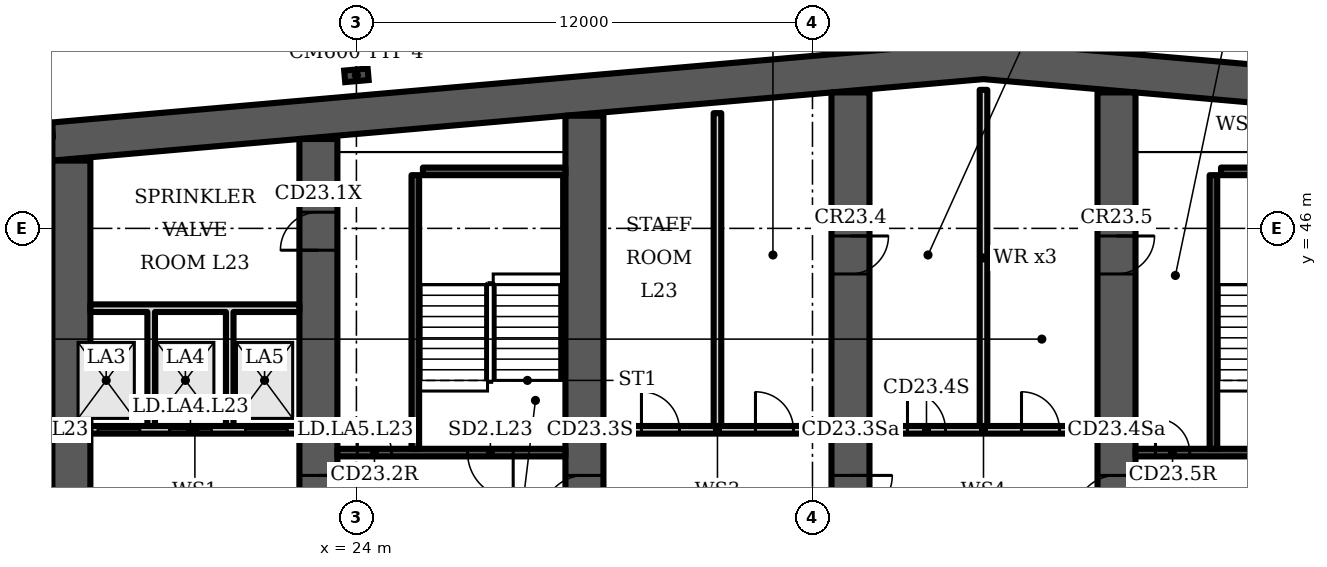
"""IFC4 building model, lengths in metres.
Left out: names, types, materials, properties, quantities, classifications, styles, units other than length and angle.
Written with IfcOpenShell. Run it as: python <this file> out.ifc"""

import sys

from ifc_helpers import new_model, si_unit, direction, frame, frame_2d, origin, origin_2d, place, context, subcontext, project, spatial, polyline, rectangle, i_section, outline, extrude, element, fill, save


model = new_model("IFC4")
c1 = context("Model", 3, precision=1e-05, world=origin(), true_north=direction((0.0, 1.0)))
c2 = subcontext(c1, "Body", "Model", "MODEL_VIEW")
j1 = project(units=[si_unit("LENGTHUNIT", "METRE"), si_unit("PLANEANGLEUNIT", "RADIAN")], contexts=[c1])
p1 = place(None, origin())
s1 = spatial("IfcSite", under=j1, at=p1, CompositionType="ELEMENT")
p2 = place(p1, origin())
s2 = spatial("IfcBuilding", under=s1, at=p2, CompositionType="ELEMENT")
p3 = place(p2, frame((0.0, 0.0, 103.9)))
s3 = spatial("IfcBuildingStorey", under=s2, at=p3, CompositionType="ELEMENT", Elevation=103.9)
p4 = place(p3, origin())
e1 = element("IfcWall", 1, at=p4, inside=s3, PredefinedType="SHEAR", context=c2, shape_type="SweptSolid", body=[
    extrude(outline(polyline([(16.0, 47.784), (40.5, 49.927), (65.0, 47.784), (65.0, 48.787), (40.5, 50.931), (16.0, 48.787), (16.0, 47.784)])), origin(), (0.0, 0.0, 1.0), 3.6),
])
p5 = place(p3, frame((16.5, 35.0, 0.0), z_axis=(0.0, 0.0, 1.0), x_axis=(0.0, 1.0, 0.0)))
e2 = element("IfcWall", 2, at=p5, inside=s3, PredefinedType="SHEAR", context=c2, shape_type="SweptSolid", body=[
    extrude(rectangle(XDim=12.784, YDim=1.0, at=frame_2d((6.392, 0.0))), origin(), (0.0, 0.0, 1.0), 3.6),
])
p6 = place(p3, frame((23.0, 35.0, 0.0), z_axis=(0.0, 0.0, 1.0), x_axis=(0.0, 1.0, 0.0)))
e3 = element("IfcWall", 3, at=p6, inside=s3, PredefinedType="SHEAR", context=c2, shape_type="SweptSolid", body=[
    extrude(rectangle(XDim=13.352, YDim=1.0, at=frame_2d((6.676, 0.0))), origin(), (0.0, 0.0, 1.0), 3.6),
])
p7 = place(p6, frame((10.426, 0.0, 0.0)))
e4 = element("IfcOpeningElement", 4, at=p7, cuts=e3, PredefinedType="OPENING", context=c2, shape_type="SweptSolid", body=[
    extrude(rectangle(XDim=1.0, YDim=2.1, at=frame_2d((0.5, 1.05))), frame((0.0, 0.51, 0.0), z_axis=(0.0, -1.0, 0.0), x_axis=(1.0, 0.0, 0.0)), (0.0, 0.0, 1.0), 1.02),
])
p8 = place(p6, frame((3.4, 0.0, 0.0)))
e5 = element("IfcOpeningElement", 5, at=p8, cuts=e3, PredefinedType="OPENING", context=c2, shape_type="SweptSolid", body=[
    extrude(rectangle(XDim=1.1, YDim=2.1, at=frame_2d((0.55, 1.05))), frame((0.0, 0.51, 0.0), z_axis=(0.0, -1.0, 0.0), x_axis=(1.0, 0.0, 0.0)), (0.0, 0.0, 1.0), 1.02),
])
p9 = place(p3, frame((30.0, 35.0, 0.0), z_axis=(0.0, 0.0, 1.0), x_axis=(0.0, 1.0, 0.0)))
e6 = element("IfcWall", 6, at=p9, inside=s3, PredefinedType="SHEAR", context=c2, shape_type="SweptSolid", body=[
    extrude(rectangle(XDim=13.965, YDim=1.0, at=frame_2d((6.982, 0.0))), origin(), (0.0, 0.0, 1.0), 3.6),
])
p10 = place(p9, frame((3.4, 0.0, 0.0)))
e7 = element("IfcOpeningElement", 7, at=p10, cuts=e6, PredefinedType="OPENING", context=c2, shape_type="SweptSolid", body=[
    extrude(rectangle(XDim=1.1, YDim=2.1, at=frame_2d((0.55, 1.05))), frame((0.0, 0.51, 0.0), z_axis=(0.0, -1.0, 0.0), x_axis=(1.0, 0.0, 0.0)), (0.0, 0.0, 1.0), 1.02),
])
p11 = place(p3, frame((37.0, 35.0, 0.0), z_axis=(0.0, 0.0, 1.0), x_axis=(0.0, 1.0, 0.0)))
e8 = element("IfcWall", 8, at=p11, inside=s3, PredefinedType="SHEAR", context=c2, shape_type="SweptSolid", body=[
    extrude(rectangle(XDim=14.577, YDim=1.0, at=frame_2d((7.289, 0.0))), origin(), (0.0, 0.0, 1.0), 3.6),
])
p12 = place(p11, frame((3.4, 0.0, 0.0)))
e9 = element("IfcOpeningElement", 9, at=p12, cuts=e8, PredefinedType="OPENING", context=c2, shape_type="SweptSolid", body=[
    extrude(rectangle(XDim=1.1, YDim=2.1, at=frame_2d((0.55, 1.05))), frame((0.0, 0.51, 0.0), z_axis=(0.0, -1.0, 0.0), x_axis=(1.0, 0.0, 0.0)), (0.0, 0.0, 1.0), 1.02),
])
p13 = place(p11, frame((9.8, 0.0, 0.0)))
e10 = element("IfcOpeningElement", 10, at=p13, cuts=e8, PredefinedType="OPENING", context=c2, shape_type="SweptSolid", body=[
    extrude(rectangle(XDim=1.0, YDim=2.1, at=frame_2d((0.5, 1.05))), frame((0.0, 0.51, 0.0), z_axis=(0.0, -1.0, 0.0), x_axis=(1.0, 0.0, 0.0)), (0.0, 0.0, 1.0), 1.02),
])
p14 = place(p3, frame((44.0, 35.0, 0.0), z_axis=(0.0, 0.0, 1.0), x_axis=(0.0, 1.0, 0.0)))
e11 = element("IfcWall", 11, at=p14, inside=s3, PredefinedType="SHEAR", context=c2, shape_type="SweptSolid", body=[
    extrude(rectangle(XDim=14.577, YDim=1.0, at=frame_2d((7.289, 0.0))), origin(), (0.0, 0.0, 1.0), 3.6),
])
p15 = place(p14, frame((3.4, 0.0, 0.0)))
e12 = element("IfcOpeningElement", 12, at=p15, cuts=e11, PredefinedType="OPENING", context=c2, shape_type="SweptSolid", body=[
    extrude(rectangle(XDim=1.1, YDim=2.1, at=frame_2d((0.55, 1.05))), frame((0.0, 0.51, 0.0), z_axis=(0.0, -1.0, 0.0), x_axis=(1.0, 0.0, 0.0)), (0.0, 0.0, 1.0), 1.02),
])
p16 = place(p14, frame((9.8, 0.0, 0.0)))
e13 = element("IfcOpeningElement", 13, at=p16, cuts=e11, PredefinedType="OPENING", context=c2, shape_type="SweptSolid", body=[
    extrude(rectangle(XDim=1.0, YDim=2.1, at=frame_2d((0.5, 1.05))), frame((0.0, 0.51, 0.0), z_axis=(0.0, -1.0, 0.0), x_axis=(1.0, 0.0, 0.0)), (0.0, 0.0, 1.0), 1.02),
])
p17 = place(p3, frame((24.0, 50.027, 0.0), z_axis=(0.0, 0.0, 1.0), x_axis=(-0.087156, 0.996198, 0.0)))
e14 = element("IfcColumn", 14, at=p17, inside=s3, PredefinedType="COLUMN", context=c2, shape_type="SweptSolid", body=[
    extrude(i_section(OverallWidth=0.305, OverallDepth=0.62, WebThickness=0.021, FlangeThickness=0.04, FilletRadius=0.027, at=origin_2d()), origin(), (0.0, 0.0, 1.0), 3.6),
])
p18 = place(p3, frame((16.0, 48.587, 0.0), z_axis=(0.0, 0.0, 1.0), x_axis=(-0.996194, -0.087168, 0.0)))
e15 = element("IfcWall", 15, at=p18, inside=s3, PredefinedType="SOLIDWALL", context=c2, shape_type="SweptSolid", body=[
    extrude(rectangle(XDim=2.994, YDim=0.4, at=frame_2d((1.497, 0.0))), origin(), (0.0, 0.0, 1.0), 3.2),
])
p19 = place(p3, frame((17.0, 40.7, 0.0), z_axis=(0.0, 0.0, 1.0), x_axis=(1.0, 0.0, 0.0)))
e16 = element("IfcWall", 16, at=p19, inside=s3, PredefinedType="PARTITIONING", context=c2, shape_type="SweptSolid", body=[
    extrude(rectangle(XDim=5.5, YDim=0.2, at=frame_2d((2.75, 0.0))), origin(), (0.0, 0.0, 1.0), 3.2),
])
p20 = place(p19, frame((0.2, 0.0, 0.0)))
e17 = element("IfcOpeningElement", 17, at=p20, cuts=e16, PredefinedType="OPENING", context=c2, shape_type="SweptSolid", body=[
    extrude(rectangle(XDim=1.1, YDim=2.1, at=frame_2d((0.55, 1.05))), frame((0.0, 0.11, 0.0), z_axis=(0.0, -1.0, 0.0), x_axis=(1.0, 0.0, 0.0)), (0.0, 0.0, 1.0), 0.22),
])
p21 = place(p19, frame((2.083, 0.0, 0.0)))
e18 = element("IfcOpeningElement", 18, at=p21, cuts=e16, PredefinedType="OPENING", context=c2, shape_type="SweptSolid", body=[
    extrude(rectangle(XDim=1.1, YDim=2.1, at=frame_2d((0.55, 1.05))), frame((0.0, 0.11, 0.0), z_axis=(0.0, -1.0, 0.0), x_axis=(1.0, 0.0, 0.0)), (0.0, 0.0, 1.0), 0.22),
])
p22 = place(p19, frame((4.083, 0.0, 0.0)))
e19 = element("IfcOpeningElement", 19, at=p22, cuts=e16, PredefinedType="OPENING", context=c2, shape_type="SweptSolid", body=[
    extrude(rectangle(XDim=1.1, YDim=2.1, at=frame_2d((0.55, 1.05))), frame((0.0, 0.11, 0.0), z_axis=(0.0, -1.0, 0.0), x_axis=(1.0, 0.0, 0.0)), (0.0, 0.0, 1.0), 0.22),
])
p23 = place(p3, origin())
e20 = element("IfcWall", 20, at=p23, inside=s3, PredefinedType="PARTITIONING", context=c2, shape_type="SweptSolid", body=[
    extrude(outline(polyline([(18.7, 40.8), (18.5, 40.8), (18.5, 43.8), (17.0, 43.8), (17.0, 44.0), (22.5, 44.0), (22.5, 43.8), (20.767, 43.8), (20.767, 40.8), (20.567, 40.8), (20.567, 43.8), (18.7, 43.8), (18.7, 40.8)])), origin(), (0.0, 0.0, 1.0), 3.2),
])
p24 = place(p3, frame((23.5, 40.1, 0.0), z_axis=(0.0, 0.0, 1.0), x_axis=(1.0, 0.0, 0.0)))
e21 = element("IfcWall", 21, at=p24, inside=s3, PredefinedType="SHEAR", context=c2, shape_type="SweptSolid", body=[
    extrude(rectangle(XDim=6.0, YDim=0.2, at=frame_2d((3.0, 0.0))), origin(), (0.0, 0.0, 1.0), 3.2),
])
p25 = place(p24, frame((3.425, 0.0, 0.0)))
e22 = element("IfcOpeningElement", 22, at=p25, cuts=e21, PredefinedType="OPENING", context=c2, shape_type="SweptSolid", body=[
    extrude(rectangle(XDim=1.2, YDim=2.1, at=frame_2d((0.6, 1.05))), frame((0.0, 0.11, 0.0), z_axis=(0.0, -1.0, 0.0), x_axis=(1.0, 0.0, 0.0)), (0.0, 0.0, 1.0), 0.22),
])
p26 = place(p24, frame((0.525, 0.0, 0.0)))
e23 = element("IfcOpeningElement", 23, at=p26, cuts=e21, PredefinedType="OPENING", context=c2, shape_type="SweptSolid", body=[
    extrude(rectangle(XDim=0.9, YDim=2.1, at=frame_2d((0.45, 1.05))), frame((0.0, 0.11, 0.0), z_axis=(0.0, -1.0, 0.0), x_axis=(1.0, 0.0, 0.0)), (0.0, 0.0, 1.0), 0.22),
])
p27 = place(p3, frame((25.55, 40.2, 0.0), z_axis=(0.0, 0.0, 1.0), x_axis=(0.0, 1.0, 0.0)))
e24 = element("IfcWall", 24, at=p27, inside=s3, PredefinedType="SHEAR", context=c2, shape_type="SweptSolid", body=[
    extrude(rectangle(XDim=7.2, YDim=0.2, at=frame_2d((3.6, 0.0))), origin(), (0.0, 0.0, 1.0), 3.2),
])
p28 = place(p3, frame((25.75, 47.5, 0.0), z_axis=(0.0, 0.0, 1.0), x_axis=(1.0, 0.0, 0.0)))
e25 = element("IfcWall", 25, at=p28, inside=s3, PredefinedType="SHEAR", context=c2, shape_type="SweptSolid", body=[
    extrude(rectangle(XDim=3.75, YDim=0.2, at=frame_2d((1.875, 0.0))), origin(), (0.0, 0.0, 1.0), 3.2),
])
p29 = place(p3, frame((30.5, 40.7, 0.0), z_axis=(0.0, 0.0, 1.0), x_axis=(1.0, 0.0, 0.0)))
e26 = element("IfcWall", 26, at=p29, inside=s3, PredefinedType="PARTITIONING", context=c2, shape_type="SweptSolid", body=[
    extrude(rectangle(XDim=6.0, YDim=0.2, at=frame_2d((3.0, 0.0))), origin(), (0.0, 0.0, 1.0), 3.2),
])
p30 = place(p29, frame((1.0, 0.0, 0.0)))
e27 = element("IfcOpeningElement", 27, at=p30, cuts=e26, PredefinedType="OPENING", context=c2, shape_type="SweptSolid", body=[
    extrude(rectangle(XDim=1.0, YDim=2.1, at=frame_2d((0.5, 1.05))), frame((0.0, 0.11, 0.0), z_axis=(0.0, -1.0, 0.0), x_axis=(1.0, 0.0, 0.0)), (0.0, 0.0, 1.0), 0.22),
])
p31 = place(p29, frame((4.0, 0.0, 0.0)))
e28 = element("IfcOpeningElement", 28, at=p31, cuts=e26, PredefinedType="OPENING", context=c2, shape_type="SweptSolid", body=[
    extrude(rectangle(XDim=1.0, YDim=2.1, at=frame_2d((0.5, 1.05))), frame((0.0, 0.11, 0.0), z_axis=(0.0, -1.0, 0.0), x_axis=(1.0, 0.0, 0.0)), (0.0, 0.0, 1.0), 0.22),
])
p32 = place(p3, frame((33.5, 40.8, 0.0), z_axis=(0.0, 0.0, 1.0), x_axis=(0.0, 1.0, 0.0)))
e29 = element("IfcWall", 29, at=p32, inside=s3, PredefinedType="PARTITIONING", context=c2, shape_type="SweptSolid", body=[
    extrude(rectangle(XDim=8.232, YDim=0.2, at=frame_2d((4.116, 0.0))), origin(), (0.0, 0.0, 1.0), 3.2),
])
p33 = place(p3, frame((37.5, 40.7, 0.0), z_axis=(0.0, 0.0, 1.0), x_axis=(1.0, 0.0, 0.0)))
e30 = element("IfcWall", 30, at=p33, inside=s3, PredefinedType="PARTITIONING", context=c2, shape_type="SweptSolid", body=[
    extrude(rectangle(XDim=6.0, YDim=0.2, at=frame_2d((3.0, 0.0))), origin(), (0.0, 0.0, 1.0), 3.2),
])
p34 = place(p33, frame((1.0, 0.0, 0.0)))
e31 = element("IfcOpeningElement", 31, at=p34, cuts=e30, PredefinedType="OPENING", context=c2, shape_type="SweptSolid", body=[
    extrude(rectangle(XDim=1.0, YDim=2.1, at=frame_2d((0.5, 1.05))), frame((0.0, 0.11, 0.0), z_axis=(0.0, -1.0, 0.0), x_axis=(1.0, 0.0, 0.0)), (0.0, 0.0, 1.0), 0.22),
])
p35 = place(p33, frame((4.0, 0.0, 0.0)))
e32 = element("IfcOpeningElement", 32, at=p35, cuts=e30, PredefinedType="OPENING", context=c2, shape_type="SweptSolid", body=[
    extrude(rectangle(XDim=1.0, YDim=2.1, at=frame_2d((0.5, 1.05))), frame((0.0, 0.11, 0.0), z_axis=(0.0, -1.0, 0.0), x_axis=(1.0, 0.0, 0.0)), (0.0, 0.0, 1.0), 0.22),
])
p36 = place(p3, frame((40.5, 40.8, 0.0), z_axis=(0.0, 0.0, 1.0), x_axis=(0.0, 1.0, 0.0)))
e33 = element("IfcWall", 33, at=p36, inside=s3, PredefinedType="PARTITIONING", context=c2, shape_type="SweptSolid", body=[
    extrude(rectangle(XDim=8.844, YDim=0.2, at=frame_2d((4.422, 0.0))), origin(), (0.0, 0.0, 1.0), 3.2),
])
p37 = place(p3, frame((44.5, 40.1, 0.0), z_axis=(0.0, 0.0, 1.0), x_axis=(1.0, 0.0, 0.0)))
e34 = element("IfcWall", 34, at=p37, inside=s3, PredefinedType="SHEAR", context=c2, shape_type="SweptSolid", body=[
    extrude(rectangle(XDim=6.0, YDim=0.2, at=frame_2d((3.0, 0.0))), origin(), (0.0, 0.0, 1.0), 3.2),
])
p38 = place(p37, frame((3.425, 0.0, 0.0)))
e35 = element("IfcOpeningElement", 35, at=p38, cuts=e34, PredefinedType="OPENING", context=c2, shape_type="SweptSolid", body=[
    extrude(rectangle(XDim=1.2, YDim=2.1, at=frame_2d((0.6, 1.05))), frame((0.0, 0.11, 0.0), z_axis=(0.0, -1.0, 0.0), x_axis=(1.0, 0.0, 0.0)), (0.0, 0.0, 1.0), 0.22),
])
p39 = place(p37, frame((0.525, 0.0, 0.0)))
e36 = element("IfcOpeningElement", 36, at=p39, cuts=e34, PredefinedType="OPENING", context=c2, shape_type="SweptSolid", body=[
    extrude(rectangle(XDim=0.9, YDim=2.1, at=frame_2d((0.45, 1.05))), frame((0.0, 0.11, 0.0), z_axis=(0.0, -1.0, 0.0), x_axis=(1.0, 0.0, 0.0)), (0.0, 0.0, 1.0), 0.22),
])
p40 = place(p3, frame((46.55, 40.2, 0.0), z_axis=(0.0, 0.0, 1.0), x_axis=(0.0, 1.0, 0.0)))
e37 = element("IfcWall", 37, at=p40, inside=s3, PredefinedType="SHEAR", context=c2, shape_type="SweptSolid", body=[
    extrude(rectangle(XDim=7.2, YDim=0.2, at=frame_2d((3.6, 0.0))), origin(), (0.0, 0.0, 1.0), 3.2),
])
p41 = place(p3, frame((46.75, 47.5, 0.0), z_axis=(0.0, 0.0, 1.0), x_axis=(1.0, 0.0, 0.0)))
e38 = element("IfcWall", 38, at=p41, inside=s3, PredefinedType="SHEAR", context=c2, shape_type="SweptSolid", body=[
    extrude(rectangle(XDim=3.75, YDim=0.2, at=frame_2d((1.875, 0.0))), origin(), (0.0, 0.0, 1.0), 3.2),
])
p42 = place(p20, origin())
e39 = element("IfcDoor", 39, at=p42, inside=s3, OperationType="DOUBLE_DOOR_SLIDING", PredefinedType="DOOR", context=c2, shape_type="SweptSolid", body=[
    extrude(rectangle(XDim=1.1, YDim=2.1, at=frame_2d((0.55, 1.05))), frame((0.0, 0.025, 0.0), z_axis=(0.0, -1.0, 0.0), x_axis=(1.0, 0.0, 0.0)), (0.0, 0.0, 1.0), 0.05),
])
fill(e17, e39)
p43 = place(p21, origin())
e40 = element("IfcDoor", 40, at=p43, inside=s3, OperationType="DOUBLE_DOOR_SLIDING", PredefinedType="DOOR", context=c2, shape_type="SweptSolid", body=[
    extrude(rectangle(XDim=1.1, YDim=2.1, at=frame_2d((0.55, 1.05))), frame((0.0, 0.025, 0.0), z_axis=(0.0, -1.0, 0.0), x_axis=(1.0, 0.0, 0.0)), (0.0, 0.0, 1.0), 0.05),
])
fill(e18, e40)
p44 = place(p22, origin())
e41 = element("IfcDoor", 41, at=p44, inside=s3, OperationType="DOUBLE_DOOR_SLIDING", PredefinedType="DOOR", context=c2, shape_type="SweptSolid", body=[
    extrude(rectangle(XDim=1.1, YDim=2.1, at=frame_2d((0.55, 1.05))), frame((0.0, 0.025, 0.0), z_axis=(0.0, -1.0, 0.0), x_axis=(1.0, 0.0, 0.0)), (0.0, 0.0, 1.0), 0.05),
])
fill(e19, e41)
p45 = place(p7, origin())
e42 = element("IfcDoor", 42, at=p45, inside=s3, OperationType="SINGLE_SWING_LEFT", PredefinedType="DOOR", context=c2, shape_type="SweptSolid", body=[
    extrude(rectangle(XDim=1.0, YDim=2.1, at=frame_2d((0.5, 1.05))), frame((0.0, 0.5, 0.0), z_axis=(0.0, -1.0, 0.0), x_axis=(1.0, 0.0, 0.0)), (0.0, 0.0, 1.0), 1.0),
])
fill(e4, e42)
p46 = place(p25, origin())
e43 = element("IfcDoor", 43, at=p46, inside=s3, OperationType="SINGLE_SWING_RIGHT", PredefinedType="DOOR", context=c2, shape_type="SweptSolid", body=[
    extrude(rectangle(XDim=1.2, YDim=2.1, at=frame_2d((0.6, 1.05))), frame((0.0, 0.025, 0.0), z_axis=(0.0, -1.0, 0.0), x_axis=(1.0, 0.0, 0.0)), (0.0, 0.0, 1.0), 0.05),
])
fill(e22, e43)
p47 = place(p26, origin())
e44 = element("IfcDoor", 44, at=p47, inside=s3, OperationType="SINGLE_SWING_LEFT", PredefinedType="DOOR", context=c2, shape_type="SweptSolid", body=[
    extrude(rectangle(XDim=0.9, YDim=2.1, at=frame_2d((0.45, 1.05))), frame((0.0, 0.025, 0.0), z_axis=(0.0, -1.0, 0.0), x_axis=(1.0, 0.0, 0.0)), (0.0, 0.0, 1.0), 0.05),
])
fill(e23, e44)
p48 = place(p30, origin())
e45 = element("IfcDoor", 45, at=p48, inside=s3, OperationType="SINGLE_SWING_LEFT", PredefinedType="DOOR", context=c2, shape_type="SweptSolid", body=[
    extrude(rectangle(XDim=1.0, YDim=2.1, at=frame_2d((0.5, 1.05))), frame((0.0, 0.025, 0.0), z_axis=(0.0, -1.0, 0.0), x_axis=(1.0, 0.0, 0.0)), (0.0, 0.0, 1.0), 0.05),
])
fill(e27, e45)
p49 = place(p31, origin())
e46 = element("IfcDoor", 46, at=p49, inside=s3, OperationType="SINGLE_SWING_LEFT", PredefinedType="DOOR", context=c2, shape_type="SweptSolid", body=[
    extrude(rectangle(XDim=1.0, YDim=2.1, at=frame_2d((0.5, 1.05))), frame((0.0, 0.025, 0.0), z_axis=(0.0, -1.0, 0.0), x_axis=(1.0, 0.0, 0.0)), (0.0, 0.0, 1.0), 0.05),
])
fill(e28, e46)
p50 = place(p34, origin())
e47 = element("IfcDoor", 47, at=p50, inside=s3, OperationType="SINGLE_SWING_LEFT", PredefinedType="DOOR", context=c2, shape_type="SweptSolid", body=[
    extrude(rectangle(XDim=1.0, YDim=2.1, at=frame_2d((0.5, 1.05))), frame((0.0, 0.025, 0.0), z_axis=(0.0, -1.0, 0.0), x_axis=(1.0, 0.0, 0.0)), (0.0, 0.0, 1.0), 0.05),
])
fill(e31, e47)
p51 = place(p35, origin())
e48 = element("IfcDoor", 48, at=p51, inside=s3, OperationType="SINGLE_SWING_LEFT", PredefinedType="DOOR", context=c2, shape_type="SweptSolid", body=[
    extrude(rectangle(XDim=1.0, YDim=2.1, at=frame_2d((0.5, 1.05))), frame((0.0, 0.025, 0.0), z_axis=(0.0, -1.0, 0.0), x_axis=(1.0, 0.0, 0.0)), (0.0, 0.0, 1.0), 0.05),
])
fill(e32, e48)
p52 = place(p39, origin())
e49 = element("IfcDoor", 49, at=p52, inside=s3, OperationType="SINGLE_SWING_LEFT", PredefinedType="DOOR", context=c2, shape_type="SweptSolid", body=[
    extrude(rectangle(XDim=0.9, YDim=2.1, at=frame_2d((0.45, 1.05))), frame((0.0, 0.025, 0.0), z_axis=(0.0, -1.0, 0.0), x_axis=(1.0, 0.0, 0.0)), (0.0, 0.0, 1.0), 0.05),
])
fill(e36, e49)
p53 = place(p8, origin())
e50 = element("IfcDoor", 50, at=p53, inside=s3, OperationType="SINGLE_SWING_RIGHT", PredefinedType="DOOR", context=c2, shape_type="SweptSolid", body=[
    extrude(rectangle(XDim=1.1, YDim=2.1, at=frame_2d((0.55, 1.05))), frame((0.0, 0.025, 0.0), z_axis=(0.0, -1.0, 0.0), x_axis=(1.0, 0.0, 0.0)), (0.0, 0.0, 1.0), 0.05),
])
fill(e5, e50)
p54 = place(p10, origin())
e51 = element("IfcDoor", 51, at=p54, inside=s3, OperationType="SINGLE_SWING_LEFT", PredefinedType="DOOR", context=c2, shape_type="SweptSolid", body=[
    extrude(rectangle(XDim=1.1, YDim=2.1, at=frame_2d((0.55, 1.05))), frame((0.0, 0.025, 0.0), z_axis=(0.0, -1.0, 0.0), x_axis=(1.0, 0.0, 0.0)), (0.0, 0.0, 1.0), 0.05),
])
fill(e7, e51)
p55 = place(p12, origin())
e52 = element("IfcDoor", 52, at=p55, inside=s3, OperationType="SINGLE_SWING_RIGHT", PredefinedType="DOOR", context=c2, shape_type="SweptSolid", body=[
    extrude(rectangle(XDim=1.1, YDim=2.1, at=frame_2d((0.55, 1.05))), frame((0.0, 0.025, 0.0), z_axis=(0.0, -1.0, 0.0), x_axis=(1.0, 0.0, 0.0)), (0.0, 0.0, 1.0), 0.05),
])
fill(e9, e52)
p56 = place(p13, origin())
e53 = element("IfcDoor", 53, at=p56, inside=s3, OperationType="SINGLE_SWING_RIGHT", PredefinedType="DOOR", context=c2, shape_type="SweptSolid", body=[
    extrude(rectangle(XDim=1.0, YDim=2.1, at=frame_2d((0.5, 1.05))), frame((0.0, 0.5, 0.0), z_axis=(0.0, -1.0, 0.0), x_axis=(1.0, 0.0, 0.0)), (0.0, 0.0, 1.0), 1.0),
])
fill(e10, e53)
p57 = place(p15, origin())
e54 = element("IfcDoor", 54, at=p57, inside=s3, OperationType="SINGLE_SWING_LEFT", PredefinedType="DOOR", context=c2, shape_type="SweptSolid", body=[
    extrude(rectangle(XDim=1.1, YDim=2.1, at=frame_2d((0.55, 1.05))), frame((0.0, 0.025, 0.0), z_axis=(0.0, -1.0, 0.0), x_axis=(1.0, 0.0, 0.0)), (0.0, 0.0, 1.0), 0.05),
])
fill(e12, e54)
p58 = place(p16, origin())
e55 = element("IfcDoor", 55, at=p58, inside=s3, OperationType="SINGLE_SWING_RIGHT", PredefinedType="DOOR", context=c2, shape_type="SweptSolid", body=[
    extrude(rectangle(XDim=1.0, YDim=2.1, at=frame_2d((0.5, 1.05))), frame((0.0, 0.5, 0.0), z_axis=(0.0, -1.0, 0.0), x_axis=(1.0, 0.0, 0.0)), (0.0, 0.0, 1.0), 1.0),
])
fill(e13, e55)
save(model, sys.argv[1])
